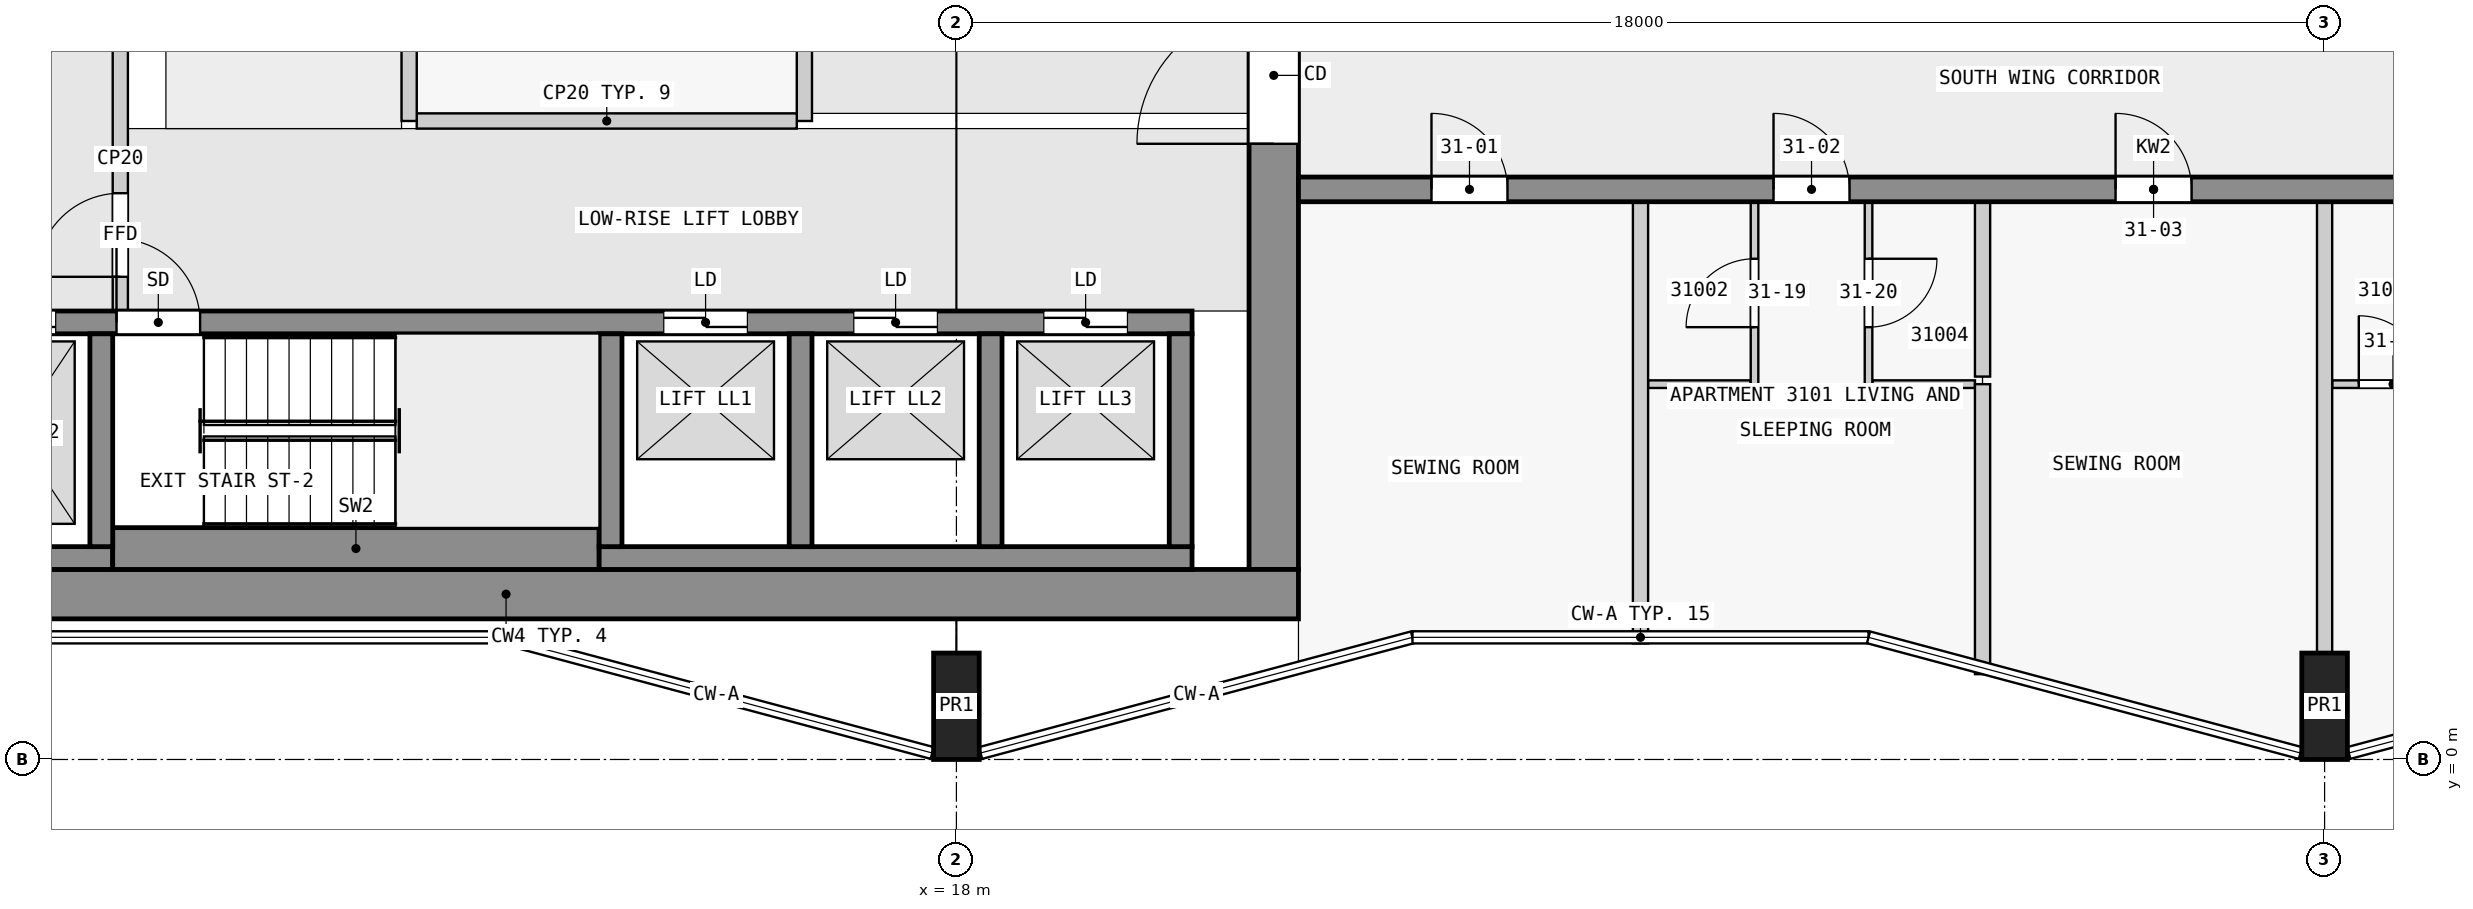
"""IFC4 building model, lengths in metres.
Left out: names, types, materials, properties, quantities, classifications, styles, units other than length and angle.
Written with IfcOpenShell. Run it as: python <this file> out.ifc"""

import sys

from ifc_helpers import new_model, si_unit, direction, frame, frame_2d, origin, origin_2d, place, context, subcontext, project, spatial, rectangle, extrude, element, fill, save


model = new_model("IFC4")
c1 = context("Model", 3, precision=1e-05, world=origin(), true_north=direction((0.0, 1.0)))
c2 = subcontext(c1, "Body", "Model", "MODEL_VIEW")
j1 = project(units=[si_unit("LENGTHUNIT", "METRE"), si_unit("PLANEANGLEUNIT", "RADIAN")], contexts=[c1])
p1 = place(None, origin())
s1 = spatial("IfcSite", under=j1, at=p1, CompositionType="ELEMENT")
p2 = place(p1, origin())
s2 = spatial("IfcBuilding", under=s1, at=p2, CompositionType="ELEMENT")
p3 = place(p2, frame((0.0, 0.0, 120.3)))
s3 = spatial("IfcBuildingStorey", under=s2, at=p3, CompositionType="ELEMENT", Elevation=120.3)
for number, where, z_axis, x_axis in (
    (1, (18.0, 0.7, 0.0), (0.0, 0.0, 1.0), (1.0, 0.0, 0.0)),
    (2, (36.0, 0.7, 0.0), (0.0, 0.0, 1.0), (1.0, 0.0, 0.0)),
):
    element("IfcColumn", number, at=place(p3, frame(where, z_axis=z_axis, x_axis=x_axis)), inside=s3, PredefinedType="COLUMN", context=c2, shape_type="SweptSolid", body=[
        extrude(rectangle(XDim=0.6, YDim=1.4, at=origin_2d()), origin(), (0.0, 0.0, 1.0), 3.5),
    ])
p4 = place(p3, frame((1.65, 2.175, 0.0), z_axis=(0.0, 0.0, 1.0), x_axis=(1.0, 0.0, 0.0)))
e3 = element("IfcWall", 3, at=p4, inside=s3, PredefinedType="SHEAR", context=c2, shape_type="SweptSolid", body=[
    extrude(rectangle(XDim=20.85, YDim=0.65, at=frame_2d((10.425, 0.0))), origin(), (0.0, 0.0, 1.0), 3.2),
])
p5 = place(p3, frame((22.175, 2.5, 0.0), z_axis=(0.0, 0.0, 1.0), x_axis=(0.0, 1.0, 0.0)))
e4 = element("IfcWall", 4, at=p5, inside=s3, PredefinedType="SHEAR", context=c2, shape_type="SweptSolid", body=[
    extrude(rectangle(XDim=14.85, YDim=0.65, at=frame_2d((7.425, 0.0))), origin(), (0.0, 0.0, 1.0), 3.2),
])
p6 = place(p5, frame((5.6, 0.0, 0.0)))
e5 = element("IfcOpeningElement", 5, at=p6, cuts=e4, PredefinedType="OPENING", context=c2, shape_type="SweptSolid", body=[
    extrude(rectangle(XDim=1.8, YDim=2.1, at=frame_2d((0.9, 1.05))), frame((0.0, 0.335, 0.0), z_axis=(0.0, -1.0, 0.0), x_axis=(1.0, 0.0, 0.0)), (0.0, 0.0, 1.0), 0.67),
])
p7 = place(p3, frame((2.3, 2.65, 0.0), z_axis=(0.0, 0.0, 1.0), x_axis=(1.0, 0.0, 0.0)))
e6 = element("IfcWall", 6, at=p7, inside=s3, PredefinedType="SHEAR", context=c2, shape_type="SweptSolid", body=[
    extrude(rectangle(XDim=4.6, YDim=0.3, at=frame_2d((2.3, 0.0))), origin(), (0.0, 0.0, 1.0), 3.2),
])
p8 = place(p3, frame((6.9, 2.775, 0.0), z_axis=(0.0, 0.0, 1.0), x_axis=(1.0, 0.0, 0.0)))
e7 = element("IfcWall", 7, at=p8, inside=s3, PredefinedType="SHEAR", context=c2, shape_type="SweptSolid", body=[
    extrude(rectangle(XDim=6.4, YDim=0.55, at=frame_2d((3.2, 0.0))), origin(), (0.0, 0.0, 1.0), 3.2),
])
p9 = place(p3, frame((13.3, 2.65, 0.0), z_axis=(0.0, 0.0, 1.0), x_axis=(1.0, 0.0, 0.0)))
e8 = element("IfcWall", 8, at=p9, inside=s3, PredefinedType="SHEAR", context=c2, shape_type="SweptSolid", body=[
    extrude(rectangle(XDim=7.8, YDim=0.3, at=frame_2d((3.9, 0.0))), origin(), (0.0, 0.0, 1.0), 3.2),
])
for number, where, z_axis, x_axis in (
    (9, (6.75, 2.8, 0.0), (0.0, 0.0, 1.0), (0.0, 1.0, 0.0)),
    (10, (13.45, 2.8, 0.0), (0.0, 0.0, 1.0), (0.0, 1.0, 0.0)),
    (11, (15.95, 2.8, 0.0), (0.0, 0.0, 1.0), (0.0, 1.0, 0.0)),
    (12, (18.45, 2.8, 0.0), (0.0, 0.0, 1.0), (0.0, 1.0, 0.0)),
    (13, (20.95, 2.8, 0.0), (0.0, 0.0, 1.0), (0.0, 1.0, 0.0)),
):
    element("IfcWall", number, at=place(p3, frame(where, z_axis=z_axis, x_axis=x_axis)), inside=s3, PredefinedType="SHEAR", context=c2, shape_type="SweptSolid", body=[
        extrude(rectangle(XDim=2.8, YDim=0.3, at=frame_2d((1.4, 0.0))), origin(), (0.0, 0.0, 1.0), 3.2),
    ])
p10 = place(p3, frame((2.3, 5.75, 0.0), z_axis=(0.0, 0.0, 1.0), x_axis=(1.0, 0.0, 0.0)))
e14 = element("IfcWall", 14, at=p10, inside=s3, PredefinedType="SHEAR", context=c2, shape_type="SweptSolid", body=[
    extrude(rectangle(XDim=18.8, YDim=0.3, at=frame_2d((9.4, 0.0))), origin(), (0.0, 0.0, 1.0), 3.2),
])
p11 = place(p10, frame((4.65, 0.0, 0.0)))
e15 = element("IfcOpeningElement", 15, at=p11, cuts=e14, PredefinedType="OPENING", context=c2, shape_type="SweptSolid", body=[
    extrude(rectangle(XDim=1.1, YDim=2.1, at=frame_2d((0.55, 1.05))), frame((0.0, 0.16, 0.0), z_axis=(0.0, -1.0, 0.0), x_axis=(1.0, 0.0, 0.0)), (0.0, 0.0, 1.0), 0.32),
])
p12 = place(p10, frame((0.45, 0.0, 0.0)))
e16 = element("IfcOpeningElement", 16, at=p12, cuts=e14, PredefinedType="OPENING", context=c2, shape_type="SweptSolid", body=[
    extrude(rectangle(XDim=1.1, YDim=2.1, at=frame_2d((0.55, 1.05))), frame((0.0, 0.16, 0.0), z_axis=(0.0, -1.0, 0.0), x_axis=(1.0, 0.0, 0.0)), (0.0, 0.0, 1.0), 0.32),
])
p13 = place(p10, frame((2.75, 0.0, 0.0)))
e17 = element("IfcOpeningElement", 17, at=p13, cuts=e14, PredefinedType="OPENING", context=c2, shape_type="SweptSolid", body=[
    extrude(rectangle(XDim=1.1, YDim=2.1, at=frame_2d((0.55, 1.05))), frame((0.0, 0.16, 0.0), z_axis=(0.0, -1.0, 0.0), x_axis=(1.0, 0.0, 0.0)), (0.0, 0.0, 1.0), 0.32),
])
p14 = place(p10, frame((11.85, 0.0, 0.0)))
e18 = element("IfcOpeningElement", 18, at=p14, cuts=e14, PredefinedType="OPENING", context=c2, shape_type="SweptSolid", body=[
    extrude(rectangle(XDim=1.1, YDim=2.1, at=frame_2d((0.55, 1.05))), frame((0.0, 0.16, 0.0), z_axis=(0.0, -1.0, 0.0), x_axis=(1.0, 0.0, 0.0)), (0.0, 0.0, 1.0), 0.32),
])
p15 = place(p10, frame((14.35, 0.0, 0.0)))
e19 = element("IfcOpeningElement", 19, at=p15, cuts=e14, PredefinedType="OPENING", context=c2, shape_type="SweptSolid", body=[
    extrude(rectangle(XDim=1.1, YDim=2.1, at=frame_2d((0.55, 1.05))), frame((0.0, 0.16, 0.0), z_axis=(0.0, -1.0, 0.0), x_axis=(1.0, 0.0, 0.0)), (0.0, 0.0, 1.0), 0.32),
])
p16 = place(p10, frame((16.85, 0.0, 0.0)))
e20 = element("IfcOpeningElement", 20, at=p16, cuts=e14, PredefinedType="OPENING", context=c2, shape_type="SweptSolid", body=[
    extrude(rectangle(XDim=1.1, YDim=2.1, at=frame_2d((0.55, 1.05))), frame((0.0, 0.16, 0.0), z_axis=(0.0, -1.0, 0.0), x_axis=(1.0, 0.0, 0.0)), (0.0, 0.0, 1.0), 0.32),
])
p17 = place(p3, frame((22.5, 7.5, 0.0), z_axis=(0.0, 0.0, 1.0), x_axis=(1.0, 0.0, 0.0)))
e21 = element("IfcWall", 21, at=p17, inside=s3, PredefinedType="SHEAR", context=c2, shape_type="SweptSolid", body=[
    extrude(rectangle(XDim=22.5, YDim=0.325, at=frame_2d((11.25, 0.0))), origin(), (0.0, 0.0, 1.0), 3.2),
])
p18 = place(p17, frame((1.75, 0.0, 0.0)))
e22 = element("IfcOpeningElement", 22, at=p18, cuts=e21, PredefinedType="OPENING", context=c2, shape_type="SweptSolid", body=[
    extrude(rectangle(XDim=1.0, YDim=2.1, at=frame_2d((0.5, 1.05))), frame((0.0, 0.172, 0.0), z_axis=(0.0, -1.0, 0.0), x_axis=(1.0, 0.0, 0.0)), (0.0, 0.0, 1.0), 0.345),
])
p19 = place(p17, frame((6.25, 0.0, 0.0)))
e23 = element("IfcOpeningElement", 23, at=p19, cuts=e21, PredefinedType="OPENING", context=c2, shape_type="SweptSolid", body=[
    extrude(rectangle(XDim=1.0, YDim=2.1, at=frame_2d((0.5, 1.05))), frame((0.0, 0.172, 0.0), z_axis=(0.0, -1.0, 0.0), x_axis=(1.0, 0.0, 0.0)), (0.0, 0.0, 1.0), 0.345),
])
p20 = place(p17, frame((10.75, 0.0, 0.0)))
e24 = element("IfcOpeningElement", 24, at=p20, cuts=e21, PredefinedType="OPENING", context=c2, shape_type="SweptSolid", body=[
    extrude(rectangle(XDim=1.0, YDim=2.1, at=frame_2d((0.5, 1.05))), frame((0.0, 0.172, 0.0), z_axis=(0.0, -1.0, 0.0), x_axis=(1.0, 0.0, 0.0)), (0.0, 0.0, 1.0), 0.345),
])
p21 = place(p17, frame((16.85, 0.0, 0.0)))
e25 = element("IfcOpeningElement", 25, at=p21, cuts=e21, PredefinedType="OPENING", context=c2, shape_type="SweptSolid", body=[
    extrude(rectangle(XDim=1.0, YDim=2.1, at=frame_2d((0.5, 1.05))), frame((0.0, 0.172, 0.0), z_axis=(0.0, -1.0, 0.0), x_axis=(1.0, 0.0, 0.0)), (0.0, 0.0, 1.0), 0.345),
])
p22 = place(p3, frame((7.0, 5.9, 0.0), z_axis=(0.0, 0.0, 1.0), x_axis=(0.0, 1.0, 0.0)))
e26 = element("IfcWall", 26, at=p22, inside=s3, PredefinedType="PARTITIONING", context=c2, shape_type="SweptSolid", body=[
    extrude(rectangle(XDim=4.0, YDim=0.2, at=frame_2d((2.0, 0.0))), origin(), (0.0, 0.0, 1.0), 3.2),
])
p23 = place(p22, frame((0.45, 0.0, 0.0)))
e27 = element("IfcOpeningElement", 27, at=p23, cuts=e26, PredefinedType="OPENING", context=c2, shape_type="SweptSolid", body=[
    extrude(rectangle(XDim=1.1, YDim=2.1, at=frame_2d((0.55, 1.05))), frame((0.0, 0.11, 0.0), z_axis=(0.0, -1.0, 0.0), x_axis=(1.0, 0.0, 0.0)), (0.0, 0.0, 1.0), 0.22),
])
p24 = place(p3, frame((10.8, 8.4, 0.0), z_axis=(0.0, 0.0, 1.0), x_axis=(0.0, 1.0, 0.0)))
e28 = element("IfcWall", 28, at=p24, inside=s3, PredefinedType="PARTITIONING", context=c2, shape_type="SweptSolid", body=[
    extrude(rectangle(XDim=6.2, YDim=0.2, at=frame_2d((3.1, 0.0))), origin(), (0.0, 0.0, 1.0), 3.2),
])
p25 = place(p3, frame((10.9, 8.4, 0.0), z_axis=(0.0, 0.0, 1.0), x_axis=(1.0, 0.0, 0.0)))
e29 = element("IfcWall", 29, at=p25, inside=s3, PredefinedType="PARTITIONING", context=c2, shape_type="SweptSolid", body=[
    extrude(rectangle(XDim=5.0, YDim=0.2, at=frame_2d((2.5, 0.0))), origin(), (0.0, 0.0, 1.0), 3.2),
])
p26 = place(p3, frame((16.0, 8.4, 0.0), z_axis=(0.0, 0.0, 1.0), x_axis=(0.0, 1.0, 0.0)))
e30 = element("IfcWall", 30, at=p26, inside=s3, PredefinedType="PARTITIONING", context=c2, shape_type="SweptSolid", body=[
    extrude(rectangle(XDim=6.2, YDim=0.2, at=frame_2d((3.1, 0.0))), origin(), (0.0, 0.0, 1.0), 3.2),
])
p27 = place(p26, frame((3.15, 0.0, 0.0)))
e31 = element("IfcOpeningElement", 31, at=p27, cuts=e30, PredefinedType="OPENING", context=c2, shape_type="SweptSolid", body=[
    extrude(rectangle(XDim=0.9, YDim=2.1, at=frame_2d((0.45, 1.05))), frame((0.0, 0.11, 0.0), z_axis=(0.0, -1.0, 0.0), x_axis=(1.0, 0.0, 0.0)), (0.0, 0.0, 1.0), 0.22),
])
for number, where, z_axis, x_axis in (
    (32, (27.1, 4.938, 0.0), (0.0, 0.0, 1.0), (1.0, 0.0, 0.0)),
    (33, (30.05, 4.938, 0.0), (0.0, 0.0, 1.0), (1.0, 0.0, 0.0)),
):
    element("IfcWall", number, at=place(p3, frame(where, z_axis=z_axis, x_axis=x_axis)), inside=s3, PredefinedType="PARTITIONING", context=c2, shape_type="SweptSolid", body=[
        extrude(rectangle(XDim=1.35, YDim=0.1, at=frame_2d((0.675, 0.0))), origin(), (0.0, 0.0, 1.0), 3.2),
    ])
p28 = place(p3, frame((36.1, 4.938, 0.0), z_axis=(0.0, 0.0, 1.0), x_axis=(1.0, 0.0, 0.0)))
e34 = element("IfcWall", 34, at=p28, inside=s3, PredefinedType="PARTITIONING", context=c2, shape_type="SweptSolid", body=[
    extrude(rectangle(XDim=3.0, YDim=0.1, at=frame_2d((1.5, 0.0))), origin(), (0.0, 0.0, 1.0), 3.2),
])
p29 = place(p28, frame((0.35, 0.0, 0.0)))
e35 = element("IfcOpeningElement", 35, at=p29, cuts=e34, PredefinedType="OPENING", context=c2, shape_type="SweptSolid", body=[
    extrude(rectangle(XDim=0.9, YDim=2.1, at=frame_2d((0.45, 1.05))), frame((0.0, 0.06, 0.0), z_axis=(0.0, -1.0, 0.0), x_axis=(1.0, 0.0, 0.0)), (0.0, 0.0, 1.0), 0.12),
])
p30 = place(p3, frame((27.0, 1.527, 0.0), z_axis=(0.0, 0.0, 1.0), x_axis=(0.0, 1.0, 0.0)))
e36 = element("IfcWall", 36, at=p30, inside=s3, PredefinedType="PARTITIONING", context=c2, shape_type="SweptSolid", body=[
    extrude(rectangle(XDim=5.811, YDim=0.2, at=frame_2d((2.905, 0.0))), origin(), (0.0, 0.0, 1.0), 3.2),
])
p31 = place(p3, frame((28.5, 4.938, 0.0), z_axis=(0.0, 0.0, 1.0), x_axis=(0.0, 1.0, 0.0)))
e37 = element("IfcWall", 37, at=p31, inside=s3, PredefinedType="PARTITIONING", context=c2, shape_type="SweptSolid", body=[
    extrude(rectangle(XDim=2.4, YDim=0.1, at=frame_2d((1.2, 0.0))), origin(), (0.0, 0.0, 1.0), 3.2),
])
p32 = place(p31, frame((0.75, 0.0, 0.0)))
e38 = element("IfcOpeningElement", 38, at=p32, cuts=e37, PredefinedType="OPENING", context=c2, shape_type="SweptSolid", body=[
    extrude(rectangle(XDim=0.9, YDim=2.1, at=frame_2d((0.45, 1.05))), frame((0.0, 0.06, 0.0), z_axis=(0.0, -1.0, 0.0), x_axis=(1.0, 0.0, 0.0)), (0.0, 0.0, 1.0), 0.12),
])
p33 = place(p3, frame((30.0, 7.337, 0.0), z_axis=(0.0, 0.0, 1.0), x_axis=(0.0, -1.0, 0.0)))
e39 = element("IfcWall", 39, at=p33, inside=s3, PredefinedType="PARTITIONING", context=c2, shape_type="SweptSolid", body=[
    extrude(rectangle(XDim=2.4, YDim=0.1, at=frame_2d((1.2, 0.0))), origin(), (0.0, 0.0, 1.0), 3.2),
])
p34 = place(p33, frame((0.75, 0.0, 0.0)))
e40 = element("IfcOpeningElement", 40, at=p34, cuts=e39, PredefinedType="OPENING", context=c2, shape_type="SweptSolid", body=[
    extrude(rectangle(XDim=0.9, YDim=2.1, at=frame_2d((0.45, 1.05))), frame((0.0, 0.06, 0.0), z_axis=(0.0, -1.0, 0.0), x_axis=(1.0, 0.0, 0.0)), (0.0, 0.0, 1.0), 0.12),
])
p35 = place(p3, frame((31.5, 4.938, 0.0), z_axis=(0.0, 0.0, 1.0), x_axis=(0.0, -1.0, 0.0)))
e41 = element("IfcWall", 41, at=p35, inside=s3, PredefinedType="PARTITIONING", context=c2, shape_type="SweptSolid", body=[
    extrude(rectangle(XDim=3.815, YDim=0.2, at=frame_2d((1.908, 0.0))), origin(), (0.0, 0.0, 1.0), 3.2),
])
p36 = place(p3, frame((31.5, 5.038, 0.0), z_axis=(0.0, 0.0, 1.0), x_axis=(0.0, 1.0, 0.0)))
e42 = element("IfcWall", 42, at=p36, inside=s3, PredefinedType="PARTITIONING", context=c2, shape_type="SweptSolid", body=[
    extrude(rectangle(XDim=2.3, YDim=0.2, at=frame_2d((1.15, 0.0))), origin(), (0.0, 0.0, 1.0), 3.2),
])
p37 = place(p3, frame((36.0, 1.4, 0.0), z_axis=(0.0, 0.0, 1.0), x_axis=(0.0, 1.0, 0.0)))
e43 = element("IfcWall", 43, at=p37, inside=s3, PredefinedType="PARTITIONING", context=c2, shape_type="SweptSolid", body=[
    extrude(rectangle(XDim=5.938, YDim=0.2, at=frame_2d((2.969, 0.0))), origin(), (0.0, 0.0, 1.0), 3.2),
])
p38 = place(p23, origin())
e44 = element("IfcDoor", 44, at=p38, inside=s3, OperationType="SINGLE_SWING_LEFT", PredefinedType="DOOR", context=c2, shape_type="SweptSolid", body=[
    extrude(rectangle(XDim=1.1, YDim=2.1, at=frame_2d((0.55, 1.05))), frame((0.0, 0.025, 0.0), z_axis=(0.0, -1.0, 0.0), x_axis=(1.0, 0.0, 0.0)), (0.0, 0.0, 1.0), 0.05),
])
fill(e27, e44)
p39 = place(p11, origin())
e45 = element("IfcDoor", 45, at=p39, inside=s3, OperationType="SINGLE_SWING_LEFT", PredefinedType="DOOR", context=c2, shape_type="SweptSolid", body=[
    extrude(rectangle(XDim=1.1, YDim=2.1, at=frame_2d((0.55, 1.05))), frame((0.0, 0.025, 0.0), z_axis=(0.0, -1.0, 0.0), x_axis=(1.0, 0.0, 0.0)), (0.0, 0.0, 1.0), 0.05),
])
fill(e15, e45)
p40 = place(p13, origin())
e46 = element("IfcDoor", 46, at=p40, inside=s3, OperationType="DOUBLE_DOOR_SLIDING", PredefinedType="DOOR", context=c2, shape_type="SweptSolid", body=[
    extrude(rectangle(XDim=1.1, YDim=2.1, at=frame_2d((0.55, 1.05))), frame((0.0, 0.025, 0.0), z_axis=(0.0, -1.0, 0.0), x_axis=(1.0, 0.0, 0.0)), (0.0, 0.0, 1.0), 0.05),
])
fill(e17, e46)
p41 = place(p14, origin())
e47 = element("IfcDoor", 47, at=p41, inside=s3, OperationType="DOUBLE_DOOR_SLIDING", PredefinedType="DOOR", context=c2, shape_type="SweptSolid", body=[
    extrude(rectangle(XDim=1.1, YDim=2.1, at=frame_2d((0.55, 1.05))), frame((0.0, 0.025, 0.0), z_axis=(0.0, -1.0, 0.0), x_axis=(1.0, 0.0, 0.0)), (0.0, 0.0, 1.0), 0.05),
])
fill(e18, e47)
p42 = place(p15, origin())
e48 = element("IfcDoor", 48, at=p42, inside=s3, OperationType="DOUBLE_DOOR_SLIDING", PredefinedType="DOOR", context=c2, shape_type="SweptSolid", body=[
    extrude(rectangle(XDim=1.1, YDim=2.1, at=frame_2d((0.55, 1.05))), frame((0.0, 0.025, 0.0), z_axis=(0.0, -1.0, 0.0), x_axis=(1.0, 0.0, 0.0)), (0.0, 0.0, 1.0), 0.05),
])
fill(e19, e48)
p43 = place(p16, origin())
e49 = element("IfcDoor", 49, at=p43, inside=s3, OperationType="DOUBLE_DOOR_SLIDING", PredefinedType="DOOR", context=c2, shape_type="SweptSolid", body=[
    extrude(rectangle(XDim=1.1, YDim=2.1, at=frame_2d((0.55, 1.05))), frame((0.0, 0.025, 0.0), z_axis=(0.0, -1.0, 0.0), x_axis=(1.0, 0.0, 0.0)), (0.0, 0.0, 1.0), 0.05),
])
fill(e20, e49)
p44 = place(p6, origin())
e50 = element("IfcDoor", 50, at=p44, inside=s3, OperationType="DOUBLE_DOOR_SINGLE_SWING", PredefinedType="DOOR", context=c2, shape_type="SweptSolid", body=[
    extrude(rectangle(XDim=1.8, YDim=2.1, at=frame_2d((0.9, 1.05))), frame((0.0, 0.025, 0.0), z_axis=(0.0, -1.0, 0.0), x_axis=(1.0, 0.0, 0.0)), (0.0, 0.0, 1.0), 0.05),
])
fill(e5, e50)
p45 = place(p18, origin())
e51 = element("IfcDoor", 51, at=p45, inside=s3, OperationType="SINGLE_SWING_LEFT", PredefinedType="DOOR", context=c2, shape_type="SweptSolid", body=[
    extrude(rectangle(XDim=1.0, YDim=2.1, at=frame_2d((0.5, 1.05))), frame((0.0, 0.025, 0.0), z_axis=(0.0, -1.0, 0.0), x_axis=(1.0, 0.0, 0.0)), (0.0, 0.0, 1.0), 0.05),
])
fill(e22, e51)
p46 = place(p19, origin())
e52 = element("IfcDoor", 52, at=p46, inside=s3, OperationType="SINGLE_SWING_LEFT", PredefinedType="DOOR", context=c2, shape_type="SweptSolid", body=[
    extrude(rectangle(XDim=1.0, YDim=2.1, at=frame_2d((0.5, 1.05))), frame((0.0, 0.025, 0.0), z_axis=(0.0, -1.0, 0.0), x_axis=(1.0, 0.0, 0.0)), (0.0, 0.0, 1.0), 0.05),
])
fill(e23, e52)
p47 = place(p20, origin())
e53 = element("IfcDoor", 53, at=p47, inside=s3, OperationType="SINGLE_SWING_LEFT", PredefinedType="DOOR", context=c2, shape_type="SweptSolid", body=[
    extrude(rectangle(XDim=1.0, YDim=2.1, at=frame_2d((0.5, 1.05))), frame((0.0, 0.025, 0.0), z_axis=(0.0, -1.0, 0.0), x_axis=(1.0, 0.0, 0.0)), (0.0, 0.0, 1.0), 0.05),
])
fill(e24, e53)
p48 = place(p32, origin())
e54 = element("IfcDoor", 54, at=p48, inside=s3, OperationType="SINGLE_SWING_LEFT", PredefinedType="DOOR", context=c2, shape_type="SweptSolid", body=[
    extrude(rectangle(XDim=0.9, YDim=2.1, at=frame_2d((0.45, 1.05))), frame((0.0, 0.025, 0.0), z_axis=(0.0, -1.0, 0.0), x_axis=(1.0, 0.0, 0.0)), (0.0, 0.0, 1.0), 0.05),
])
fill(e38, e54)
p49 = place(p34, origin())
e55 = element("IfcDoor", 55, at=p49, inside=s3, OperationType="SINGLE_SWING_LEFT", PredefinedType="DOOR", context=c2, shape_type="SweptSolid", body=[
    extrude(rectangle(XDim=0.9, YDim=2.1, at=frame_2d((0.45, 1.05))), frame((0.0, 0.025, 0.0), z_axis=(0.0, -1.0, 0.0), x_axis=(1.0, 0.0, 0.0)), (0.0, 0.0, 1.0), 0.05),
])
fill(e40, e55)
p50 = place(p29, origin())
e56 = element("IfcDoor", 56, at=p50, inside=s3, OperationType="SINGLE_SWING_LEFT", PredefinedType="DOOR", context=c2, shape_type="SweptSolid", body=[
    extrude(rectangle(XDim=0.9, YDim=2.1, at=frame_2d((0.45, 1.05))), frame((0.0, 0.025, 0.0), z_axis=(0.0, -1.0, 0.0), x_axis=(1.0, 0.0, 0.0)), (0.0, 0.0, 1.0), 0.05),
])
fill(e35, e56)
save(model, sys.argv[1])
